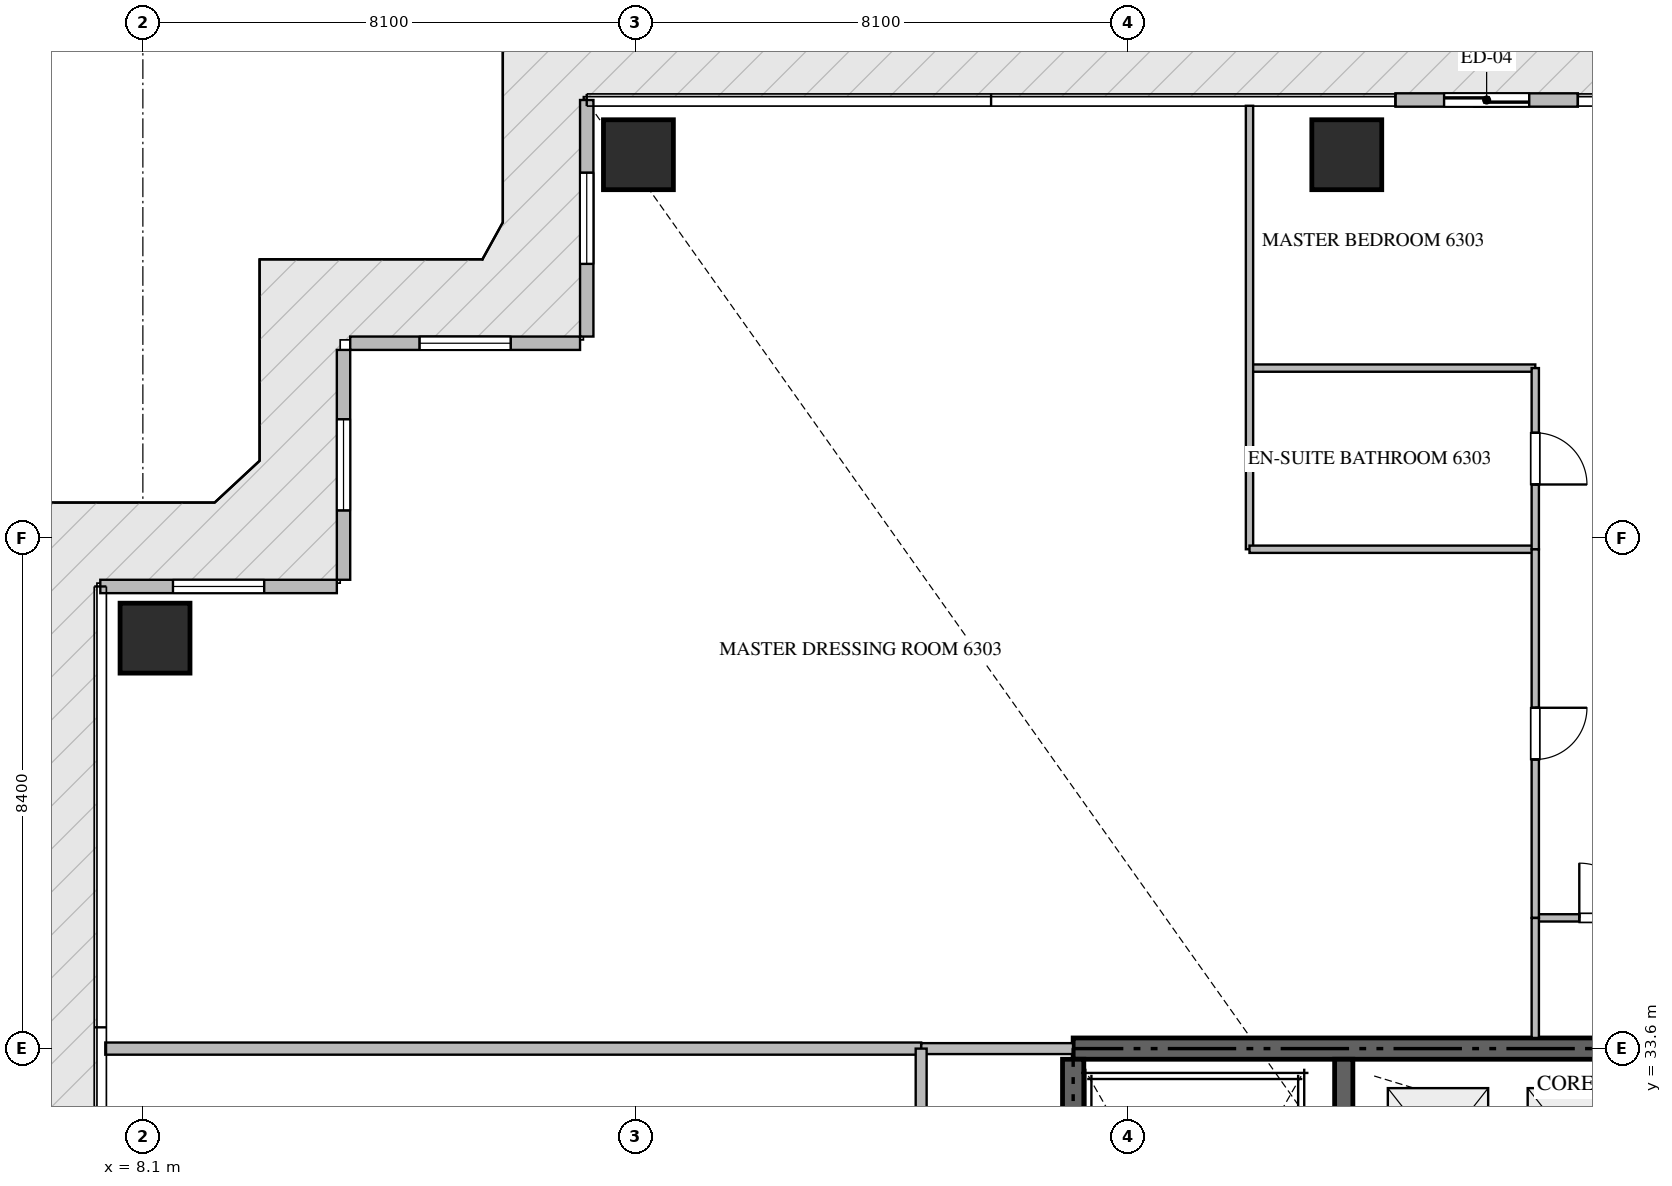
"""IFC4 building model, lengths in metres.
Left out: names, types, materials, properties, quantities, classifications, styles, units other than length and angle.
Written with IfcOpenShell. Run it as: python <this file> out.ifc"""

import sys

from ifc_helpers import new_model, si_unit, direction, frame, frame_2d, origin, origin_2d, place, context, subcontext, project, spatial, rectangle, extrude, source, transform, mapped, element, fill, save


model = new_model("IFC4")
c1 = context("Model", 3, precision=1e-05, world=origin(), true_north=direction((0.0, 1.0)))
c2 = subcontext(c1, "Body", "Model", "MODEL_VIEW")
j1 = project(units=[si_unit("LENGTHUNIT", "METRE"), si_unit("PLANEANGLEUNIT", "RADIAN")], contexts=[c1])
p1 = place(None, origin())
s1 = spatial("IfcSite", under=j1, at=p1, CompositionType="ELEMENT")
p2 = place(p1, origin())
s2 = spatial("IfcBuilding", under=s1, at=p2, CompositionType="ELEMENT")
p3 = place(p2, frame((0.0, 0.0, 252.8)))
s3 = spatial("IfcBuildingStorey", under=s2, at=p3, CompositionType="ELEMENT", Elevation=252.8)
p4 = place(p3, frame((41.4, 33.6, -0.26), z_axis=(0.0, 0.0, 1.0), x_axis=(-1.0, 0.0, 0.0)))
e1 = element("IfcWall", 1, at=p4, inside=s3, PredefinedType="SHEAR", context=c2, shape_type="SweptSolid", body=[
    extrude(rectangle(XDim=18.0, YDim=0.35, at=frame_2d((9.0, 0.0))), origin(), (0.0, 0.0, 1.0), 3.848),
])
p5 = place(p3, frame((23.4, 24.25, -0.26), z_axis=(0.0, 0.0, 1.0), x_axis=(0.0, 1.0, 0.0)))
e2 = element("IfcWall", 2, at=p5, inside=s3, PredefinedType="SHEAR", context=c2, shape_type="SweptSolid", body=[
    extrude(rectangle(XDim=9.175, YDim=0.35, at=frame_2d((4.587, 0.0))), origin(), (0.0, 0.0, 1.0), 3.848),
])
p6 = place(p3, frame((27.85, 23.55, -0.26), z_axis=(0.0, 0.0, 1.0), x_axis=(0.0, 1.0, 0.0)))
e3 = element("IfcWall", 3, at=p6, inside=s3, PredefinedType="SHEAR", context=c2, shape_type="SweptSolid", body=[
    extrude(rectangle(XDim=9.875, YDim=0.3, at=frame_2d((4.938, 0.0))), origin(), (0.0, 0.0, 1.0), 3.848),
])
m1 = source(origin(), c2, "Body", "SweptSolid", [
    extrude(rectangle(XDim=1.15, YDim=1.15, at=origin_2d()), origin(), (0.0, 0.0, 1.0), 3.85),
])
for number, where, z_axis, x_axis in (
    (4, (16.25, 48.3, -0.26), (0.0, 0.0, 1.0), (1.0, 0.0, 0.0)),
    (5, (27.9, 48.3, -0.26), (0.0, 0.0, 1.0), (1.0, 0.0, 0.0)),
    (6, (8.3, 40.35, -0.26), (0.0, 0.0, 1.0), (1.0, 0.0, 0.0)),
):
    element("IfcColumn", number, at=place(p3, frame(where, z_axis=z_axis, x_axis=x_axis)), inside=s3, PredefinedType="COLUMN", context=c2, shape_type="MappedRepresentation", body=[
        mapped(m1, transform((0.0, 0.0, 0.0), scale=1.0)),
    ])
p7 = place(p3, frame((31.7, 49.2, 0.0), z_axis=(0.0, 0.0, 1.0), x_axis=(-1.0, 0.0, 0.0)))
e7 = element("IfcWall", 7, at=p7, inside=s3, PredefinedType="ELEMENTEDWALL", context=c2, shape_type="SweptSolid", body=[
    extrude(rectangle(XDim=3.0, YDim=0.22, at=frame_2d((1.5, 0.0))), origin(), (0.0, 0.0, 1.0), 3.575),
])
p8 = place(p7, frame((0.8, 0.0, 0.0)))
e8 = element("IfcOpeningElement", 8, at=p8, cuts=e7, PredefinedType="OPENING", context=c2, shape_type="SweptSolid", body=[
    extrude(rectangle(XDim=1.4, YDim=2.25, at=frame_2d((0.7, 1.125))), frame((0.0, 0.12, 0.0), z_axis=(0.0, -1.0, 0.0), x_axis=(1.0, 0.0, 0.0)), (0.0, 0.0, 1.0), 0.24),
])
p9 = place(p3, frame((15.4, 49.2, 0.0), z_axis=(0.0, 0.0, 1.0), x_axis=(0.0, -1.0, 0.0)))
e9 = element("IfcWall", 9, at=p9, inside=s3, PredefinedType="ELEMENTEDWALL", context=c2, shape_type="SweptSolid", body=[
    extrude(rectangle(XDim=3.89, YDim=0.22, at=frame_2d((1.945, 0.0))), origin(), (0.0, 0.0, 1.0), 3.575),
])
p10 = place(p9, frame((1.195, 0.0, 0.65)))
e10 = element("IfcOpeningElement", 10, at=p10, cuts=e9, PredefinedType="OPENING", context=c2, shape_type="SweptSolid", body=[
    extrude(rectangle(XDim=1.5, YDim=2.25, at=frame_2d((0.75, 1.125))), frame((0.0, 0.12, 0.0), z_axis=(0.0, -1.0, 0.0), x_axis=(1.0, 0.0, 0.0)), (0.0, 0.0, 1.0), 0.24),
])
p11 = place(p3, frame((15.29, 45.2, 0.0), z_axis=(0.0, 0.0, 1.0), x_axis=(-1.0, 0.0, 0.0)))
e11 = element("IfcWall", 11, at=p11, inside=s3, PredefinedType="ELEMENTEDWALL", context=c2, shape_type="SweptSolid", body=[
    extrude(rectangle(XDim=3.78, YDim=0.22, at=frame_2d((1.89, 0.0))), origin(), (0.0, 0.0, 1.0), 3.575),
])
p12 = place(p11, frame((1.14, 0.0, 0.65)))
e12 = element("IfcOpeningElement", 12, at=p12, cuts=e11, PredefinedType="OPENING", context=c2, shape_type="SweptSolid", body=[
    extrude(rectangle(XDim=1.5, YDim=2.25, at=frame_2d((0.75, 1.125))), frame((0.0, 0.12, 0.0), z_axis=(0.0, -1.0, 0.0), x_axis=(1.0, 0.0, 0.0)), (0.0, 0.0, 1.0), 0.24),
])
p13 = place(p3, frame((11.4, 45.09, 0.0), z_axis=(0.0, 0.0, 1.0), x_axis=(0.0, -1.0, 0.0)))
e13 = element("IfcWall", 13, at=p13, inside=s3, PredefinedType="ELEMENTEDWALL", context=c2, shape_type="SweptSolid", body=[
    extrude(rectangle(XDim=3.78, YDim=0.22, at=frame_2d((1.89, 0.0))), origin(), (0.0, 0.0, 1.0), 3.575),
])
p14 = place(p13, frame((1.14, 0.0, 0.65)))
e14 = element("IfcOpeningElement", 14, at=p14, cuts=e13, PredefinedType="OPENING", context=c2, shape_type="SweptSolid", body=[
    extrude(rectangle(XDim=1.5, YDim=2.25, at=frame_2d((0.75, 1.125))), frame((0.0, 0.12, 0.0), z_axis=(0.0, -1.0, 0.0), x_axis=(1.0, 0.0, 0.0)), (0.0, 0.0, 1.0), 0.24),
])
p15 = place(p3, frame((11.29, 41.2, 0.0), z_axis=(0.0, 0.0, 1.0), x_axis=(-1.0, 0.0, 0.0)))
e15 = element("IfcWall", 15, at=p15, inside=s3, PredefinedType="ELEMENTEDWALL", context=c2, shape_type="SweptSolid", body=[
    extrude(rectangle(XDim=3.89, YDim=0.22, at=frame_2d((1.945, 0.0))), origin(), (0.0, 0.0, 1.0), 3.575),
])
p16 = place(p15, frame((1.195, 0.0, 0.65)))
e16 = element("IfcOpeningElement", 16, at=p16, cuts=e15, PredefinedType="OPENING", context=c2, shape_type="SweptSolid", body=[
    extrude(rectangle(XDim=1.5, YDim=2.25, at=frame_2d((0.75, 1.125))), frame((0.0, 0.12, 0.0), z_axis=(0.0, -1.0, 0.0), x_axis=(1.0, 0.0, 0.0)), (0.0, 0.0, 1.0), 0.24),
])
p17 = place(p3, frame((7.482, 33.6, 0.0), z_axis=(0.0, 0.0, 1.0), x_axis=(1.0, 0.0, 0.0)))
e17 = element("IfcWall", 17, at=p17, inside=s3, PredefinedType="PARTITIONING", context=c2, shape_type="SweptSolid", body=[
    extrude(rectangle(XDim=13.418, YDim=0.2, at=frame_2d((6.709, 0.0))), origin(), (0.0, 0.0, 1.0), 3.59),
])
p18 = place(p3, frame((20.902, 33.6, 0.0), z_axis=(0.0, 0.0, 1.0), x_axis=(1.0, 0.0, 0.0)))
e18 = element("IfcWall", 18, at=p18, inside=s3, PredefinedType="PARTITIONING", context=c2, shape_type="SweptSolid", body=[
    extrude(rectangle(XDim=2.496, YDim=0.18, at=frame_2d((1.248, 0.0))), origin(), (0.0, 0.0, 1.0), 3.59),
])
p19 = place(p3, frame((20.9, 16.8, 0.0), z_axis=(0.0, 0.0, 1.0), x_axis=(0.0, 1.0, 0.0)))
e19 = element("IfcWall", 19, at=p19, inside=s3, PredefinedType="PARTITIONING", context=c2, shape_type="SweptSolid", body=[
    extrude(rectangle(XDim=16.8, YDim=0.18, at=frame_2d((8.4, 0.0))), origin(), (0.0, 0.0, 1.0), 3.59),
])
p20 = place(p19, frame((14.5, 0.0, 0.0)))
e20 = element("IfcOpeningElement", 20, at=p20, cuts=e19, PredefinedType="OPENING", context=c2, shape_type="SweptSolid", body=[
    extrude(rectangle(XDim=1.0, YDim=2.15, at=frame_2d((0.5, 1.075))), frame((0.0, 0.1, 0.0), z_axis=(0.0, -1.0, 0.0), x_axis=(1.0, 0.0, 0.0)), (0.0, 0.0, 1.0), 0.2),
])
p21 = place(p3, frame((31.0, 35.75, 0.0), z_axis=(0.0, 0.0, 1.0), x_axis=(1.0, 0.0, 0.0)))
e21 = element("IfcWall", 21, at=p21, inside=s3, PredefinedType="PARTITIONING", context=c2, shape_type="SweptSolid", body=[
    extrude(rectangle(XDim=2.348, YDim=0.12, at=frame_2d((1.174, 0.0))), origin(), (0.0, 0.0, 1.0), 3.59),
])
p22 = place(p21, frame((0.724, 0.0, 0.0)))
e22 = element("IfcOpeningElement", 22, at=p22, cuts=e21, PredefinedType="OPENING", context=c2, shape_type="SweptSolid", body=[
    extrude(rectangle(XDim=0.9, YDim=2.1, at=frame_2d((0.45, 1.05))), frame((0.0, 0.07, 0.0), z_axis=(0.0, -1.0, 0.0), x_axis=(1.0, 0.0, 0.0)), (0.0, 0.0, 1.0), 0.14),
])
p23 = place(p3, frame((26.3, 44.791, 0.0), z_axis=(0.0, 0.0, 1.0), x_axis=(1.0, 0.0, 0.0)))
e23 = element("IfcWall", 23, at=p23, inside=s3, PredefinedType="PARTITIONING", context=c2, shape_type="SweptSolid", body=[
    extrude(rectangle(XDim=4.7, YDim=0.12, at=frame_2d((2.35, 0.0))), origin(), (0.0, 0.0, 1.0), 3.59),
])
p24 = place(p3, frame((26.3, 49.105, 0.0), z_axis=(0.0, 0.0, 1.0), x_axis=(0.0, -1.0, 0.0)))
e24 = element("IfcWall", 24, at=p24, inside=s3, PredefinedType="PARTITIONING", context=c2, shape_type="SweptSolid", body=[
    extrude(rectangle(XDim=7.293, YDim=0.12, at=frame_2d((3.646, 0.0))), origin(), (0.0, 0.0, 1.0), 3.59),
])
p25 = place(p3, frame((26.3, 41.812, 0.0), z_axis=(0.0, 0.0, 1.0), x_axis=(1.0, 0.0, 0.0)))
e25 = element("IfcWall", 25, at=p25, inside=s3, PredefinedType="PARTITIONING", context=c2, shape_type="SweptSolid", body=[
    extrude(rectangle(XDim=4.7, YDim=0.12, at=frame_2d((2.35, 0.0))), origin(), (0.0, 0.0, 1.0), 3.59),
])
p26 = place(p3, frame((31.0, 44.791, 0.0), z_axis=(0.0, 0.0, 1.0), x_axis=(0.0, -1.0, 0.0)))
e26 = element("IfcWall", 26, at=p26, inside=s3, PredefinedType="PARTITIONING", context=c2, shape_type="SweptSolid", body=[
    extrude(rectangle(XDim=2.979, YDim=0.12, at=frame_2d((1.49, 0.0))), origin(), (0.0, 0.0, 1.0), 3.59),
])
p27 = place(p26, frame((1.064, 0.0, 0.0)))
e27 = element("IfcOpeningElement", 27, at=p27, cuts=e26, PredefinedType="OPENING", context=c2, shape_type="SweptSolid", body=[
    extrude(rectangle(XDim=0.85, YDim=2.1, at=frame_2d((0.425, 1.05))), frame((0.0, 0.07, 0.0), z_axis=(0.0, -1.0, 0.0), x_axis=(1.0, 0.0, 0.0)), (0.0, 0.0, 1.0), 0.14),
])
p28 = place(p3, frame((31.0, 41.81, 0.0), z_axis=(0.0, 0.0, 1.0), x_axis=(0.0, -1.0, 0.0)))
e28 = element("IfcWall", 28, at=p28, inside=s3, PredefinedType="PARTITIONING", context=c2, shape_type="SweptSolid", body=[
    extrude(rectangle(XDim=6.06, YDim=0.12, at=frame_2d((3.03, 0.0))), origin(), (0.0, 0.0, 1.0), 3.59),
])
p29 = place(p28, frame((2.605, 0.0, 0.0)))
e29 = element("IfcOpeningElement", 29, at=p29, cuts=e28, PredefinedType="OPENING", context=c2, shape_type="SweptSolid", body=[
    extrude(rectangle(XDim=0.85, YDim=2.1, at=frame_2d((0.425, 1.05))), frame((0.0, 0.07, 0.0), z_axis=(0.0, -1.0, 0.0), x_axis=(1.0, 0.0, 0.0)), (0.0, 0.0, 1.0), 0.14),
])
p30 = place(p3, frame((31.0, 35.748, 0.0), z_axis=(0.0, 0.0, 1.0), x_axis=(0.0, -1.0, 0.0)))
e30 = element("IfcWall", 30, at=p30, inside=s3, PredefinedType="PARTITIONING", context=c2, shape_type="SweptSolid", body=[
    extrude(rectangle(XDim=1.973, YDim=0.12, at=frame_2d((0.987, 0.0))), origin(), (0.0, 0.0, 1.0), 3.59),
])
m2 = source(origin(), c2, "Body", "SweptSolid", [
    extrude(rectangle(XDim=1.4, YDim=2.25, at=frame_2d((0.7, 1.125))), frame((0.0, 0.025, 0.0), z_axis=(0.0, -1.0, 0.0), x_axis=(1.0, 0.0, 0.0)), (0.0, 0.0, 1.0), 0.05),
])
p31 = place(p8, origin())
e31 = element("IfcDoor", 31, at=p31, inside=s3, OperationType="SLIDING_TO_LEFT", PredefinedType="DOOR", context=c2, shape_type="MappedRepresentation", body=[
    mapped(m2, transform((0.0, 0.0, 0.0), scale=1.0)),
])
fill(e8, e31)
m3 = source(origin(), c2, "Body", "SweptSolid", [
    extrude(rectangle(XDim=1.5, YDim=2.25, at=frame_2d((0.75, 1.125))), frame((0.0, 0.03, 0.0), z_axis=(0.0, -1.0, 0.0), x_axis=(1.0, 0.0, 0.0)), (0.0, 0.0, 1.0), 0.06),
])
p32 = place(p10, origin())
e32 = element("IfcWindow", 32, at=p32, inside=s3, PartitioningType="SINGLE_PANEL", PredefinedType="WINDOW", context=c2, shape_type="MappedRepresentation", body=[
    mapped(m3, transform((0.0, 0.0, 0.0), scale=1.0)),
])
fill(e10, e32)
p33 = place(p12, origin())
e33 = element("IfcWindow", 33, at=p33, inside=s3, PartitioningType="SINGLE_PANEL", PredefinedType="WINDOW", context=c2, shape_type="MappedRepresentation", body=[
    mapped(m3, transform((0.0, 0.0, 0.0), scale=1.0)),
])
fill(e12, e33)
p34 = place(p14, origin())
e34 = element("IfcWindow", 34, at=p34, inside=s3, PartitioningType="SINGLE_PANEL", PredefinedType="WINDOW", context=c2, shape_type="MappedRepresentation", body=[
    mapped(m3, transform((0.0, 0.0, 0.0), scale=1.0)),
])
fill(e14, e34)
p35 = place(p16, origin())
e35 = element("IfcWindow", 35, at=p35, inside=s3, PartitioningType="SINGLE_PANEL", PredefinedType="WINDOW", context=c2, shape_type="MappedRepresentation", body=[
    mapped(m3, transform((0.0, 0.0, 0.0), scale=1.0)),
])
fill(e16, e35)
m4 = source(origin(), c2, "Body", "SweptSolid", [
    extrude(rectangle(XDim=0.9, YDim=2.1, at=frame_2d((0.45, 1.05))), frame((0.0, 0.025, 0.0), z_axis=(0.0, -1.0, 0.0), x_axis=(1.0, 0.0, 0.0)), (0.0, 0.0, 1.0), 0.05),
])
p36 = place(p22, origin())
e36 = element("IfcDoor", 36, at=p36, inside=s3, OperationType="SINGLE_SWING_LEFT", PredefinedType="DOOR", context=c2, shape_type="MappedRepresentation", body=[
    mapped(m4, transform((0.0, 0.0, 0.0), scale=1.0)),
])
fill(e22, e36)
m5 = source(origin(), c2, "Body", "SweptSolid", [
    extrude(rectangle(XDim=0.85, YDim=2.1, at=frame_2d((0.425, 1.05))), frame((0.0, 0.025, 0.0), z_axis=(0.0, -1.0, 0.0), x_axis=(1.0, 0.0, 0.0)), (0.0, 0.0, 1.0), 0.05),
])
p37 = place(p27, origin())
e37 = element("IfcDoor", 37, at=p37, inside=s3, OperationType="SINGLE_SWING_RIGHT", PredefinedType="DOOR", context=c2, shape_type="MappedRepresentation", body=[
    mapped(m5, transform((0.0, 0.0, 0.0), scale=1.0)),
])
fill(e27, e37)
p38 = place(p29, origin())
e38 = element("IfcDoor", 38, at=p38, inside=s3, OperationType="SINGLE_SWING_LEFT", PredefinedType="DOOR", context=c2, shape_type="MappedRepresentation", body=[
    mapped(m5, transform((0.0, 0.0, 0.0), scale=1.0)),
])
fill(e29, e38)
save(model, sys.argv[1])
